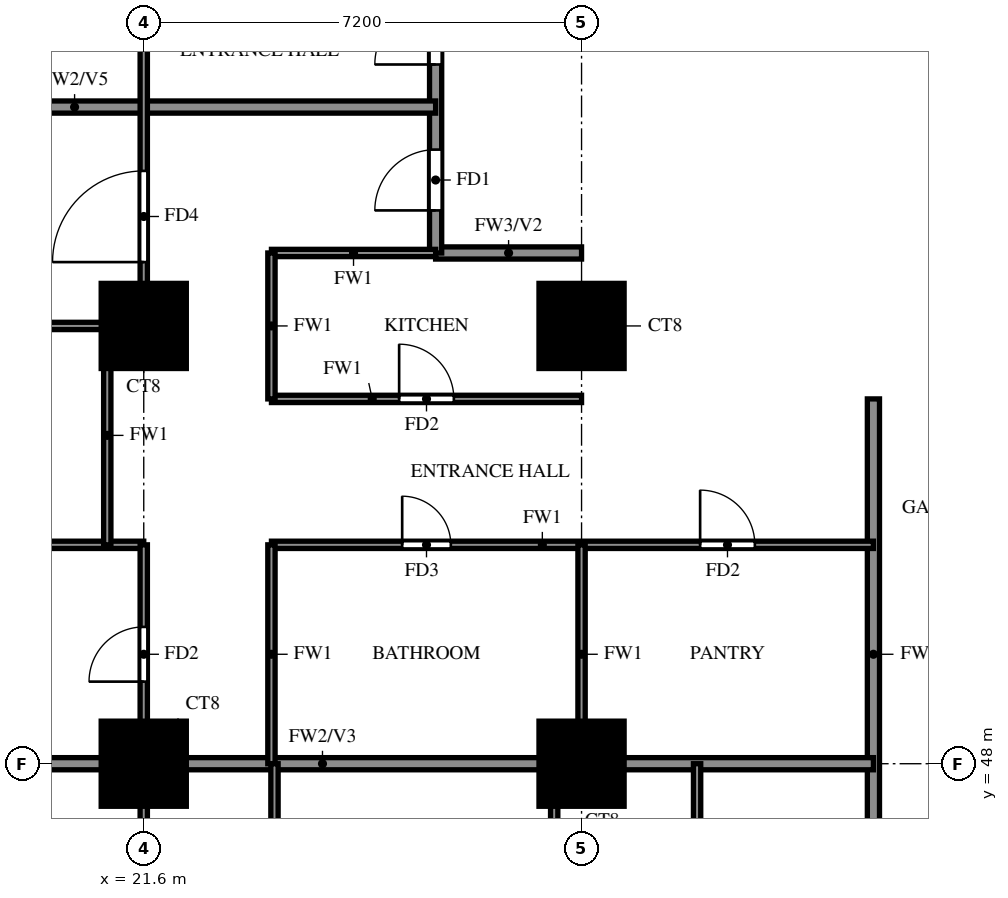
"""IFC4 building model, lengths in metres.
Left out: names, types, materials, properties, quantities, classifications, styles, units other than length and angle.
Written with IfcOpenShell. Run it as: python <this file> out.ifc"""

import sys

from ifc_helpers import new_model, si_unit, direction, frame, frame_2d, origin, origin_2d, place, context, subcontext, project, spatial, rectangle, extrude, source, transform, mapped, element, fill, save


model = new_model("IFC4")
c1 = context("Model", 3, precision=1e-05, world=origin(), true_north=direction((0.0, 1.0)))
c2 = subcontext(c1, "Body", "Model", "MODEL_VIEW")
j1 = project(units=[si_unit("LENGTHUNIT", "METRE"), si_unit("PLANEANGLEUNIT", "RADIAN")], contexts=[c1])
p1 = place(None, origin())
s1 = spatial("IfcSite", under=j1, at=p1, CompositionType="ELEMENT")
p2 = place(p1, origin())
s2 = spatial("IfcBuilding", under=s1, at=p2, CompositionType="ELEMENT")
p3 = place(p2, frame((0.0, 0.0, 58.5)))
s3 = spatial("IfcBuildingStorey", under=s2, at=p3, CompositionType="ELEMENT", Elevation=58.5)
m1 = source(origin(), c2, "Body", "SweptSolid", [
    extrude(rectangle(XDim=1.4, YDim=1.4, at=origin_2d()), origin(), (0.0, 0.0, 1.0), 3.18),
])
for number, where, z_axis, x_axis in (
    (1, (21.6, 48.0, 0.0), (0.0, 0.0, 1.0), (1.0, 0.0, 0.0)),
    (2, (28.8, 48.0, 0.0), (0.0, 0.0, 1.0), (1.0, 0.0, 0.0)),
    (3, (21.6, 55.2, 0.0), (0.0, 0.0, 1.0), (1.0, 0.0, 0.0)),
    (4, (28.8, 55.2, 0.0), (0.0, 0.0, 1.0), (1.0, 0.0, 0.0)),
):
    element("IfcColumn", number, at=place(p3, frame(where, z_axis=z_axis, x_axis=x_axis)), inside=s3, PredefinedType="COLUMN", context=c2, shape_type="MappedRepresentation", body=[
        mapped(m1, transform((0.0, 0.0, 0.0))),
    ])
p4 = place(p3, frame((26.4, 56.4, 0.0), z_axis=(0.0, 0.0, 1.0), x_axis=(1.0, 0.0, 0.0)))
e5 = element("IfcWall", 5, at=p4, inside=s3, PredefinedType="SOLIDWALL", context=c2, shape_type="SweptSolid", body=[
    extrude(rectangle(XDim=2.4, YDim=0.2, at=frame_2d((1.2, 0.0))), origin(), (0.0, 0.0, 1.0), 3.18),
])
p5 = place(p3, frame((26.4, 56.4, 0.0), z_axis=(0.0, 0.0, 1.0), x_axis=(0.0, 1.0, 0.0)))
e6 = element("IfcWall", 6, at=p5, inside=s3, PredefinedType="SOLIDWALL", context=c2, shape_type="SweptSolid", body=[
    extrude(rectangle(XDim=9.6, YDim=0.2, at=frame_2d((4.8, 0.0))), origin(), (0.0, 0.0, 1.0), 3.18),
])
p6 = place(p5, frame((0.7, 0.0, 0.0)))
e7 = element("IfcOpeningElement", 7, at=p6, cuts=e6, PredefinedType="OPENING", context=c2, shape_type="SweptSolid", body=[
    extrude(rectangle(XDim=1.0, YDim=2.1, at=frame_2d((0.5, 1.05))), frame((0.0, 0.11, 0.0), z_axis=(0.0, -1.0, 0.0), x_axis=(1.0, 0.0, 0.0)), (0.0, 0.0, 1.0), 0.22),
])
p7 = place(p5, frame((3.1, 0.0, 0.0)))
e8 = element("IfcOpeningElement", 8, at=p7, cuts=e6, PredefinedType="OPENING", context=c2, shape_type="SweptSolid", body=[
    extrude(rectangle(XDim=1.0, YDim=2.1, at=frame_2d((0.5, 1.05))), frame((0.0, 0.11, 0.0), z_axis=(0.0, -1.0, 0.0), x_axis=(1.0, 0.0, 0.0)), (0.0, 0.0, 1.0), 0.22),
])
p8 = place(p3, frame((33.6, 45.6, 0.0), z_axis=(0.0, 0.0, 1.0), x_axis=(0.0, 1.0, 0.0)))
e9 = element("IfcWall", 9, at=p8, inside=s3, PredefinedType="SOLIDWALL", context=c2, shape_type="SweptSolid", body=[
    extrude(rectangle(XDim=8.4, YDim=0.2, at=frame_2d((4.2, 0.0))), origin(), (0.0, 0.0, 1.0), 3.18),
])
p9 = place(p3, frame((14.525, 48.0, 0.0), z_axis=(0.0, 0.0, 1.0), x_axis=(1.0, 0.0, 0.0)))
e10 = element("IfcWall", 10, at=p9, inside=s3, PredefinedType="SOLIDWALL", context=c2, shape_type="SweptSolid", body=[
    extrude(rectangle(XDim=19.075, YDim=0.2, at=frame_2d((9.538, 0.0))), origin(), (0.0, 0.0, 1.0), 3.18),
])
p10 = place(p3, frame((14.525, 58.8, 0.0), z_axis=(0.0, 0.0, 1.0), x_axis=(1.0, 0.0, 0.0)))
e11 = element("IfcWall", 11, at=p10, inside=s3, PredefinedType="SOLIDWALL", context=c2, shape_type="SweptSolid", body=[
    extrude(rectangle(XDim=11.875, YDim=0.2, at=frame_2d((5.938, 0.0))), origin(), (0.0, 0.0, 1.0), 2.28),
])
p11 = place(p3, frame((14.525, 51.6, 0.0), z_axis=(0.0, 0.0, 1.0), x_axis=(1.0, 0.0, 0.0)))
e12 = element("IfcWall", 12, at=p11, inside=s3, PredefinedType="PARTITIONING", context=c2, shape_type="SweptSolid", body=[
    extrude(rectangle(XDim=7.075, YDim=0.12, at=frame_2d((3.538, 0.0))), origin(), (0.0, 0.0, 1.0), 2.28),
])
p12 = place(p11, frame((2.837, 0.0, 0.0)))
e13 = element("IfcOpeningElement", 13, at=p12, cuts=e12, PredefinedType="OPENING", context=c2, shape_type="SweptSolid", body=[
    extrude(rectangle(XDim=0.8, YDim=2.1, at=frame_2d((0.4, 1.05))), frame((0.0, 0.07, 0.0), z_axis=(0.0, -1.0, 0.0), x_axis=(1.0, 0.0, 0.0)), (0.0, 0.0, 1.0), 0.14),
])
p13 = place(p3, frame((23.7, 51.6, 0.0), z_axis=(0.0, 0.0, 1.0), x_axis=(1.0, 0.0, 0.0)))
e14 = element("IfcWall", 14, at=p13, inside=s3, PredefinedType="PARTITIONING", context=c2, shape_type="SweptSolid", body=[
    extrude(rectangle(XDim=9.9, YDim=0.12, at=frame_2d((4.95, 0.0))), origin(), (0.0, 0.0, 1.0), 3.18),
])
p14 = place(p13, frame((2.15, 0.0, 0.0)))
e15 = element("IfcOpeningElement", 15, at=p14, cuts=e14, PredefinedType="OPENING", context=c2, shape_type="SweptSolid", body=[
    extrude(rectangle(XDim=0.8, YDim=2.1, at=frame_2d((0.4, 1.05))), frame((0.0, 0.07, 0.0), z_axis=(0.0, -1.0, 0.0), x_axis=(1.0, 0.0, 0.0)), (0.0, 0.0, 1.0), 0.14),
])
p15 = place(p13, frame((7.05, 0.0, 0.0)))
e16 = element("IfcOpeningElement", 16, at=p15, cuts=e14, PredefinedType="OPENING", context=c2, shape_type="SweptSolid", body=[
    extrude(rectangle(XDim=0.9, YDim=2.1, at=frame_2d((0.45, 1.05))), frame((0.0, 0.07, 0.0), z_axis=(0.0, -1.0, 0.0), x_axis=(1.0, 0.0, 0.0)), (0.0, 0.0, 1.0), 0.14),
])
p16 = place(p3, frame((23.7, 54.0, 0.0), z_axis=(0.0, 0.0, 1.0), x_axis=(1.0, 0.0, 0.0)))
e17 = element("IfcWall", 17, at=p16, inside=s3, PredefinedType="PARTITIONING", context=c2, shape_type="SweptSolid", body=[
    extrude(rectangle(XDim=5.1, YDim=0.12, at=frame_2d((2.55, 0.0))), origin(), (0.0, 0.0, 1.0), 3.18),
])
p17 = place(p16, frame((2.1, 0.0, 0.0)))
e18 = element("IfcOpeningElement", 18, at=p17, cuts=e17, PredefinedType="OPENING", context=c2, shape_type="SweptSolid", body=[
    extrude(rectangle(XDim=0.9, YDim=2.1, at=frame_2d((0.45, 1.05))), frame((0.0, 0.07, 0.0), z_axis=(0.0, -1.0, 0.0), x_axis=(1.0, 0.0, 0.0)), (0.0, 0.0, 1.0), 0.14),
])
p18 = place(p3, frame((14.525, 55.2, 0.0), z_axis=(0.0, 0.0, 1.0), x_axis=(1.0, 0.0, 0.0)))
e19 = element("IfcWall", 19, at=p18, inside=s3, PredefinedType="PARTITIONING", context=c2, shape_type="SweptSolid", body=[
    extrude(rectangle(XDim=7.075, YDim=0.12, at=frame_2d((3.538, 0.0))), origin(), (0.0, 0.0, 1.0), 3.18),
])
p19 = place(p3, frame((23.7, 56.4, 0.0), z_axis=(0.0, 0.0, 1.0), x_axis=(1.0, 0.0, 0.0)))
e20 = element("IfcWall", 20, at=p19, inside=s3, PredefinedType="PARTITIONING", context=c2, shape_type="SweptSolid", body=[
    extrude(rectangle(XDim=2.7, YDim=0.12, at=frame_2d((1.35, 0.0))), origin(), (0.0, 0.0, 1.0), 3.18),
])
p20 = place(p3, frame((21.0, 51.6, 0.0), z_axis=(0.0, 0.0, 1.0), x_axis=(0.0, 1.0, 0.0)))
e21 = element("IfcWall", 21, at=p20, inside=s3, PredefinedType="PARTITIONING", context=c2, shape_type="SweptSolid", body=[
    extrude(rectangle(XDim=3.6, YDim=0.12, at=frame_2d((1.8, 0.0))), origin(), (0.0, 0.0, 1.0), 3.18),
])
p21 = place(p3, frame((21.6, 33.725, 0.0), z_axis=(0.0, 0.0, 1.0), x_axis=(0.0, 1.0, 0.0)))
e22 = element("IfcWall", 22, at=p21, inside=s3, PredefinedType="PARTITIONING", context=c2, shape_type="SweptSolid", body=[
    extrude(rectangle(XDim=17.875, YDim=0.12, at=frame_2d((8.938, 0.0))), origin(), (0.0, 0.0, 1.0), 3.18),
])
p22 = place(p21, frame((7.775, 0.0, 0.0)))
e23 = element("IfcOpeningElement", 23, at=p22, cuts=e22, PredefinedType="OPENING", context=c2, shape_type="SweptSolid", body=[
    extrude(rectangle(XDim=0.9, YDim=2.1, at=frame_2d((0.45, 1.05))), frame((0.0, 0.07, 0.0), z_axis=(0.0, -1.0, 0.0), x_axis=(1.0, 0.0, 0.0)), (0.0, 0.0, 1.0), 0.14),
])
p23 = place(p21, frame((15.625, 0.0, 0.0)))
e24 = element("IfcOpeningElement", 24, at=p23, cuts=e22, PredefinedType="OPENING", context=c2, shape_type="SweptSolid", body=[
    extrude(rectangle(XDim=0.9, YDim=2.1, at=frame_2d((0.45, 1.05))), frame((0.0, 0.07, 0.0), z_axis=(0.0, -1.0, 0.0), x_axis=(1.0, 0.0, 0.0)), (0.0, 0.0, 1.0), 0.14),
])
p24 = place(p3, frame((21.6, 55.2, 0.0), z_axis=(0.0, 0.0, 1.0), x_axis=(0.0, 1.0, 0.0)))
e25 = element("IfcWall", 25, at=p24, inside=s3, PredefinedType="PARTITIONING", context=c2, shape_type="SweptSolid", body=[
    extrude(rectangle(XDim=14.4, YDim=0.12, at=frame_2d((7.2, 0.0))), origin(), (0.0, 0.0, 1.0), 3.18),
])
p25 = place(p24, frame((1.05, 0.0, 0.0)))
e26 = element("IfcOpeningElement", 26, at=p25, cuts=e25, PredefinedType="OPENING", context=c2, shape_type="SweptSolid", body=[
    extrude(rectangle(XDim=1.5, YDim=2.1, at=frame_2d((0.75, 1.05))), frame((0.0, 0.07, 0.0), z_axis=(0.0, -1.0, 0.0), x_axis=(1.0, 0.0, 0.0)), (0.0, 0.0, 1.0), 0.14),
])
p26 = place(p24, frame((4.95, 0.0, 0.0)))
e27 = element("IfcOpeningElement", 27, at=p26, cuts=e25, PredefinedType="OPENING", context=c2, shape_type="SweptSolid", body=[
    extrude(rectangle(XDim=0.9, YDim=2.1, at=frame_2d((0.45, 1.05))), frame((0.0, 0.07, 0.0), z_axis=(0.0, -1.0, 0.0), x_axis=(1.0, 0.0, 0.0)), (0.0, 0.0, 1.0), 0.14),
])
p27 = place(p24, frame((10.35, 0.0, 0.0)))
e28 = element("IfcOpeningElement", 28, at=p27, cuts=e25, PredefinedType="OPENING", context=c2, shape_type="SweptSolid", body=[
    extrude(rectangle(XDim=0.9, YDim=2.1, at=frame_2d((0.45, 1.05))), frame((0.0, 0.07, 0.0), z_axis=(0.0, -1.0, 0.0), x_axis=(1.0, 0.0, 0.0)), (0.0, 0.0, 1.0), 0.14),
])
p28 = place(p3, frame((23.7, 48.0, 0.0), z_axis=(0.0, 0.0, 1.0), x_axis=(0.0, 1.0, 0.0)))
e29 = element("IfcWall", 29, at=p28, inside=s3, PredefinedType="PARTITIONING", context=c2, shape_type="SweptSolid", body=[
    extrude(rectangle(XDim=3.6, YDim=0.12, at=frame_2d((1.8, 0.0))), origin(), (0.0, 0.0, 1.0), 3.18),
])
p29 = place(p3, frame((23.7, 54.0, 0.0), z_axis=(0.0, 0.0, 1.0), x_axis=(0.0, 1.0, 0.0)))
e30 = element("IfcWall", 30, at=p29, inside=s3, PredefinedType="PARTITIONING", context=c2, shape_type="SweptSolid", body=[
    extrude(rectangle(XDim=2.4, YDim=0.12, at=frame_2d((1.2, 0.0))), origin(), (0.0, 0.0, 1.0), 3.18),
])
for number, where, z_axis, x_axis in (
    (31, (23.75, 42.9, 0.0), (0.0, 0.0, 1.0), (0.0, 1.0, 0.0)),
    (32, (28.35, 42.9, 0.0), (0.0, 0.0, 1.0), (0.0, 1.0, 0.0)),
):
    element("IfcWall", number, at=place(p3, frame(where, z_axis=z_axis, x_axis=x_axis)), inside=s3, PredefinedType="PARTITIONING", context=c2, shape_type="SweptSolid", body=[
        extrude(rectangle(XDim=5.1, YDim=0.12, at=frame_2d((2.55, 0.0))), origin(), (0.0, 0.0, 1.0), 3.18),
    ])
p30 = place(p3, frame((28.8, 48.0, 0.0), z_axis=(0.0, 0.0, 1.0), x_axis=(0.0, 1.0, 0.0)))
e33 = element("IfcWall", 33, at=p30, inside=s3, PredefinedType="PARTITIONING", context=c2, shape_type="SweptSolid", body=[
    extrude(rectangle(XDim=3.6, YDim=0.12, at=frame_2d((1.8, 0.0))), origin(), (0.0, 0.0, 1.0), 3.18),
])
p31 = place(p3, frame((30.7, 42.9, 0.0), z_axis=(0.0, 0.0, 1.0), x_axis=(0.0, 1.0, 0.0)))
e34 = element("IfcWall", 34, at=p31, inside=s3, PredefinedType="PARTITIONING", context=c2, shape_type="SweptSolid", body=[
    extrude(rectangle(XDim=5.1, YDim=0.12, at=frame_2d((2.55, 0.0))), origin(), (0.0, 0.0, 1.0), 3.18),
])
p32 = place(p6, origin())
e35 = element("IfcDoor", 35, at=p32, inside=s3, OperationType="SINGLE_SWING_RIGHT", PredefinedType="DOOR", context=c2, shape_type="SweptSolid", body=[
    extrude(rectangle(XDim=1.0, YDim=2.1, at=frame_2d((0.5, 1.05))), frame((0.0, 0.025, 0.0), z_axis=(0.0, -1.0, 0.0), x_axis=(1.0, 0.0, 0.0)), (0.0, 0.0, 1.0), 0.05),
])
fill(e7, e35)
p33 = place(p23, origin())
e36 = element("IfcDoor", 36, at=p33, inside=s3, OperationType="SINGLE_SWING_LEFT", PredefinedType="DOOR", context=c2, shape_type="SweptSolid", body=[
    extrude(rectangle(XDim=0.9, YDim=2.1, at=frame_2d((0.45, 1.05))), frame((0.0, 0.025, 0.0), z_axis=(0.0, -1.0, 0.0), x_axis=(1.0, 0.0, 0.0)), (0.0, 0.0, 1.0), 0.05),
])
fill(e24, e36)
p34 = place(p25, origin())
e37 = element("IfcDoor", 37, at=p34, inside=s3, OperationType="SINGLE_SWING_RIGHT", PredefinedType="DOOR", context=c2, shape_type="SweptSolid", body=[
    extrude(rectangle(XDim=1.5, YDim=2.1, at=frame_2d((0.75, 1.05))), frame((0.0, 0.025, 0.0), z_axis=(0.0, -1.0, 0.0), x_axis=(1.0, 0.0, 0.0)), (0.0, 0.0, 1.0), 0.05),
])
fill(e26, e37)
p35 = place(p14, origin())
e38 = element("IfcDoor", 38, at=p35, inside=s3, OperationType="SINGLE_SWING_LEFT", PredefinedType="DOOR", context=c2, shape_type="SweptSolid", body=[
    extrude(rectangle(XDim=0.8, YDim=2.1, at=frame_2d((0.4, 1.05))), frame((0.0, 0.025, 0.0), z_axis=(0.0, -1.0, 0.0), x_axis=(1.0, 0.0, 0.0)), (0.0, 0.0, 1.0), 0.05),
])
fill(e15, e38)
p36 = place(p17, origin())
e39 = element("IfcDoor", 39, at=p36, inside=s3, OperationType="SINGLE_SWING_LEFT", PredefinedType="DOOR", context=c2, shape_type="SweptSolid", body=[
    extrude(rectangle(XDim=0.9, YDim=2.1, at=frame_2d((0.45, 1.05))), frame((0.0, 0.025, 0.0), z_axis=(0.0, -1.0, 0.0), x_axis=(1.0, 0.0, 0.0)), (0.0, 0.0, 1.0), 0.05),
])
fill(e18, e39)
p37 = place(p15, origin())
e40 = element("IfcDoor", 40, at=p37, inside=s3, OperationType="SINGLE_SWING_RIGHT", PredefinedType="DOOR", context=c2, shape_type="SweptSolid", body=[
    extrude(rectangle(XDim=0.9, YDim=2.1, at=frame_2d((0.45, 1.05))), frame((0.0, 0.025, 0.0), z_axis=(0.0, -1.0, 0.0), x_axis=(1.0, 0.0, 0.0)), (0.0, 0.0, 1.0), 0.05),
])
fill(e16, e40)
p38 = place(p7, origin())
e41 = element("IfcDoor", 41, at=p38, inside=s3, OperationType="SINGLE_SWING_LEFT", PredefinedType="DOOR", context=c2, shape_type="SweptSolid", body=[
    extrude(rectangle(XDim=1.0, YDim=2.1, at=frame_2d((0.5, 1.05))), frame((0.0, 0.025, 0.0), z_axis=(0.0, -1.0, 0.0), x_axis=(1.0, 0.0, 0.0)), (0.0, 0.0, 1.0), 0.05),
])
fill(e8, e41)
save(model, sys.argv[1])
